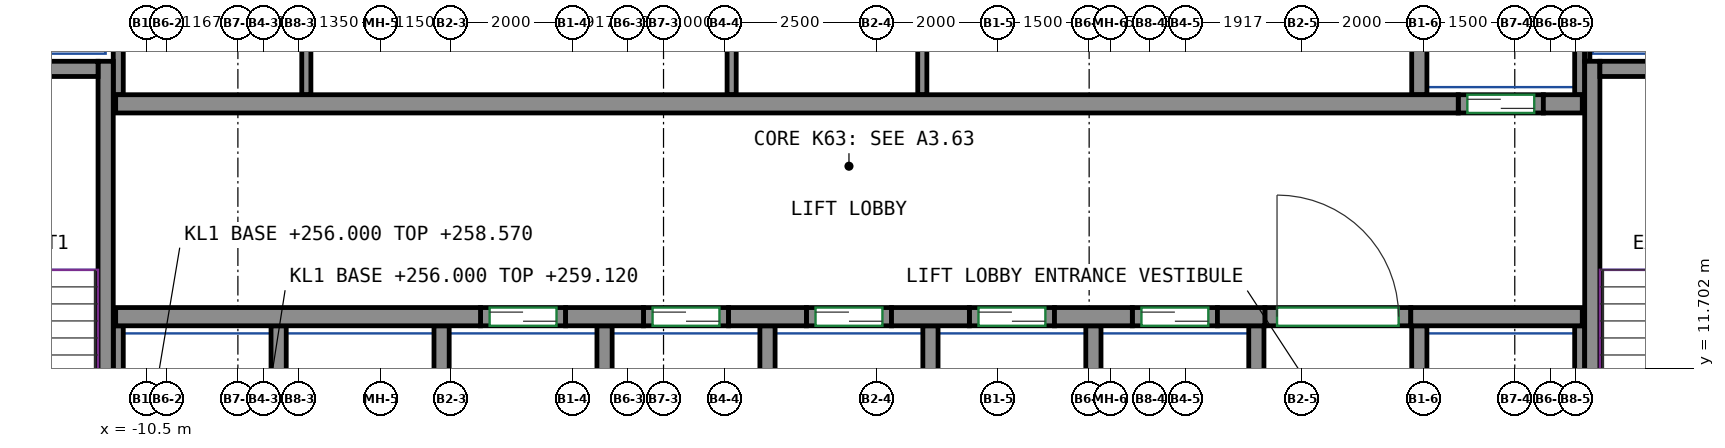
"""IFC4 building model, lengths in metres.
Left out: names, types, materials, properties, quantities, classifications, styles, units other than length and angle.
Written with IfcOpenShell. Run it as: python <this file> out.ifc"""

import sys

from ifc_helpers import new_model, si_unit, direction, frame, frame_2d, origin, place, context, subcontext, project, spatial, rectangle, extrude, source, transform, mapped, element, fill, save


model = new_model("IFC4")
c1 = context("Model", 3, precision=1e-05, world=origin(), true_north=direction((0.0, 1.0)))
c2 = subcontext(c1, "Body", "Model", "MODEL_VIEW")
j1 = project(units=[si_unit("LENGTHUNIT", "METRE"), si_unit("PLANEANGLEUNIT", "RADIAN")], contexts=[c1])
p1 = place(None, origin())
s1 = spatial("IfcSite", under=j1, at=p1, CompositionType="ELEMENT")
p2 = place(p1, origin())
s2 = spatial("IfcBuilding", under=s1, at=p2, CompositionType="ELEMENT")
p3 = place(p2, frame((0.0, 0.0, 256.0)))
s3 = spatial("IfcBuildingStorey", under=s2, at=p3, CompositionType="ELEMENT", Elevation=256.0)
m1 = source(origin(), c2, "Body", "SweptSolid", [
    extrude(rectangle(XDim=7.75, YDim=0.25, at=frame_2d((3.875, 0.0))), origin(), (0.0, 0.0, 1.0), 3.12),
])
p4 = place(p3, frame((-11.175, 9.0, 0.0), z_axis=(0.0, 0.0, 1.0), x_axis=(0.0, 1.0, 0.0)))
e1 = element("IfcWall", 1, at=p4, inside=s3, PredefinedType="SHEAR", context=c2, shape_type="MappedRepresentation", body=[
    mapped(m1, transform((0.0, 0.0, 0.0))),
])
m2 = source(origin(), c2, "Body", "SweptSolid", [
    extrude(rectangle(XDim=3.7, YDim=0.25, at=frame_2d((1.85, 0.0))), origin(), (0.0, 0.0, 1.0), 3.12),
])
p5 = place(p3, frame((-15.0, 16.625, 0.0), z_axis=(0.0, 0.0, 1.0), x_axis=(1.0, 0.0, 0.0)))
e2 = element("IfcWall", 2, at=p5, inside=s3, PredefinedType="SHEAR", context=c2, shape_type="MappedRepresentation", body=[
    mapped(m2, transform((0.0, 0.0, 0.0))),
])
p6 = place(p3, frame((13.275, 9.0, 0.0), z_axis=(0.0, 0.0, 1.0), x_axis=(0.0, 1.0, 0.0)))
e3 = element("IfcWall", 3, at=p6, inside=s3, PredefinedType="SHEAR", context=c2, shape_type="MappedRepresentation", body=[
    mapped(m1, transform((0.0, 0.0, 0.0))),
])
m3 = source(origin(), c2, "Body", "SweptSolid", [
    extrude(rectangle(XDim=3.7, YDim=0.25, at=frame_2d((1.85, 0.0))), origin(), (0.0, 0.0, 1.0), 3.12),
])
p7 = place(p3, frame((13.4, 16.625, 0.0), z_axis=(0.0, 0.0, 1.0), x_axis=(1.0, 0.0, 0.0)))
e4 = element("IfcWall", 4, at=p7, inside=s3, PredefinedType="SHEAR", context=c2, shape_type="MappedRepresentation", body=[
    mapped(m3, transform((0.0, 0.0, 0.0))),
])
m4 = source(origin(), c2, "Body", "SweptSolid", [
    extrude(rectangle(XDim=6.0, YDim=0.3, at=frame_2d((3.0, 0.0))), origin(), (0.0, 0.0, 1.0), 3.12),
])
p8 = place(p3, frame((-11.01, 12.55, 0.0), z_axis=(0.0, 0.0, 1.0), x_axis=(1.0, 0.0, 0.0)))
e5 = element("IfcWall", 5, at=p8, inside=s3, PredefinedType="SHEAR", context=c2, shape_type="MappedRepresentation", body=[
    mapped(m4, transform((0.0, 0.0, 0.0))),
])
m5 = source(origin(), c2, "Body", "SweptSolid", [
    extrude(rectangle(XDim=1.28, YDim=0.3, at=frame_2d((0.64, 0.0))), origin(), (0.0, 0.0, 1.0), 3.12),
])
for number, where, z_axis, x_axis in (
    (6, (-3.61, 12.55, 0.0), (0.0, 0.0, 1.0), (1.0, 0.0, 0.0)),
    (7, (-0.93, 12.55, 0.0), (0.0, 0.0, 1.0), (1.0, 0.0, 0.0)),
    (8, (1.75, 12.55, 0.0), (0.0, 0.0, 1.0), (1.0, 0.0, 0.0)),
    (9, (4.43, 12.55, 0.0), (0.0, 0.0, 1.0), (1.0, 0.0, 0.0)),
):
    element("IfcWall", number, at=place(p3, frame(where, z_axis=z_axis, x_axis=x_axis)), inside=s3, PredefinedType="SHEAR", context=c2, shape_type="MappedRepresentation", body=[
        mapped(m5, transform((0.0, 0.0, 0.0))),
    ])
m6 = source(origin(), c2, "Body", "SweptSolid", [
    extrude(rectangle(XDim=0.78, YDim=0.3, at=frame_2d((0.39, 0.0))), origin(), (0.0, 0.0, 1.0), 3.12),
])
p9 = place(p3, frame((7.11, 12.55, 0.0), z_axis=(0.0, 0.0, 1.0), x_axis=(1.0, 0.0, 0.0)))
e10 = element("IfcWall", 10, at=p9, inside=s3, PredefinedType="SHEAR", context=c2, shape_type="MappedRepresentation", body=[
    mapped(m6, transform((0.0, 0.0, 0.0))),
])
m7 = source(origin(), c2, "Body", "SweptSolid", [
    extrude(rectangle(XDim=2.82, YDim=0.3, at=frame_2d((1.41, 0.0))), origin(), (0.0, 0.0, 1.0), 3.12),
])
p10 = place(p3, frame((10.29, 12.55, 0.0), z_axis=(0.0, 0.0, 1.0), x_axis=(1.0, 0.0, 0.0)))
e11 = element("IfcWall", 11, at=p10, inside=s3, PredefinedType="SHEAR", context=c2, shape_type="MappedRepresentation", body=[
    mapped(m7, transform((0.0, 0.0, 0.0))),
])
m8 = source(origin(), c2, "Body", "SweptSolid", [
    extrude(rectangle(XDim=22.08, YDim=0.3, at=frame_2d((11.04, 0.0))), origin(), (0.0, 0.0, 1.0), 3.12),
])
p11 = place(p3, frame((-11.01, 16.05, 0.0), z_axis=(0.0, 0.0, 1.0), x_axis=(1.0, 0.0, 0.0)))
e12 = element("IfcWall", 12, at=p11, inside=s3, PredefinedType="SHEAR", context=c2, shape_type="MappedRepresentation", body=[
    mapped(m8, transform((0.0, 0.0, 0.0))),
])
m9 = source(origin(), c2, "Body", "SweptSolid", [
    extrude(rectangle(XDim=0.64, YDim=0.3, at=frame_2d((0.32, 0.0))), origin(), (0.0, 0.0, 1.0), 3.12),
])
p12 = place(p3, frame((12.47, 16.05, 0.0), z_axis=(0.0, 0.0, 1.0), x_axis=(1.0, 0.0, 0.0)))
e13 = element("IfcWall", 13, at=p12, inside=s3, PredefinedType="SHEAR", context=c2, shape_type="MappedRepresentation", body=[
    mapped(m9, transform((0.0, 0.0, 0.0))),
])
m10 = source(origin(), c2, "Body", "SweptSolid", [
    extrude(rectangle(XDim=1.4, YDim=0.3, at=frame_2d((0.7, 0.0))), origin(), (0.0, 0.0, 1.0), 3.12),
])
p13 = place(p3, frame((-5.01, 12.55, 0.0), z_axis=(0.0, 0.0, 1.0), x_axis=(1.0, 0.0, 0.0)))
e14 = element("IfcWall", 14, at=p13, inside=s3, PredefinedType="PARTITIONING", context=c2, shape_type="MappedRepresentation", body=[
    mapped(m10, transform((0.0, 0.0, 0.0))),
])
p14 = place(p13, frame((0.15, 0.0, 0.0)))
e15 = element("IfcOpeningElement", 15, at=p14, cuts=e14, PredefinedType="OPENING", context=c2, shape_type="SweptSolid", body=[
    extrude(rectangle(XDim=1.1, YDim=2.1, at=frame_2d((0.55, 1.05))), frame((0.0, 0.16, 0.0), z_axis=(0.0, -1.0, 0.0), x_axis=(1.0, 0.0, 0.0)), (0.0, 0.0, 1.0), 0.32),
])
m11 = source(origin(), c2, "Body", "SweptSolid", [
    extrude(rectangle(XDim=1.4, YDim=0.3, at=frame_2d((0.7, 0.0))), origin(), (0.0, 0.0, 1.0), 3.12),
])
p15 = place(p3, frame((-2.33, 12.55, 0.0), z_axis=(0.0, 0.0, 1.0), x_axis=(1.0, 0.0, 0.0)))
e16 = element("IfcWall", 16, at=p15, inside=s3, PredefinedType="PARTITIONING", context=c2, shape_type="MappedRepresentation", body=[
    mapped(m11, transform((0.0, 0.0, 0.0))),
])
p16 = place(p15, frame((0.15, 0.0, 0.0)))
e17 = element("IfcOpeningElement", 17, at=p16, cuts=e16, PredefinedType="OPENING", context=c2, shape_type="SweptSolid", body=[
    extrude(rectangle(XDim=1.1, YDim=2.1, at=frame_2d((0.55, 1.05))), frame((0.0, 0.16, 0.0), z_axis=(0.0, -1.0, 0.0), x_axis=(1.0, 0.0, 0.0)), (0.0, 0.0, 1.0), 0.32),
])
p17 = place(p3, frame((0.35, 12.55, 0.0), z_axis=(0.0, 0.0, 1.0), x_axis=(1.0, 0.0, 0.0)))
e18 = element("IfcWall", 18, at=p17, inside=s3, PredefinedType="PARTITIONING", context=c2, shape_type="MappedRepresentation", body=[
    mapped(m10, transform((0.0, 0.0, 0.0))),
])
p18 = place(p17, frame((0.15, 0.0, 0.0)))
e19 = element("IfcOpeningElement", 19, at=p18, cuts=e18, PredefinedType="OPENING", context=c2, shape_type="SweptSolid", body=[
    extrude(rectangle(XDim=1.1, YDim=2.1, at=frame_2d((0.55, 1.05))), frame((0.0, 0.16, 0.0), z_axis=(0.0, -1.0, 0.0), x_axis=(1.0, 0.0, 0.0)), (0.0, 0.0, 1.0), 0.32),
])
p19 = place(p3, frame((3.03, 12.55, 0.0), z_axis=(0.0, 0.0, 1.0), x_axis=(1.0, 0.0, 0.0)))
e20 = element("IfcWall", 20, at=p19, inside=s3, PredefinedType="PARTITIONING", context=c2, shape_type="MappedRepresentation", body=[
    mapped(m10, transform((0.0, 0.0, 0.0))),
])
p20 = place(p19, frame((0.15, 0.0, 0.0)))
e21 = element("IfcOpeningElement", 21, at=p20, cuts=e20, PredefinedType="OPENING", context=c2, shape_type="SweptSolid", body=[
    extrude(rectangle(XDim=1.1, YDim=2.1, at=frame_2d((0.55, 1.05))), frame((0.0, 0.16, 0.0), z_axis=(0.0, -1.0, 0.0), x_axis=(1.0, 0.0, 0.0)), (0.0, 0.0, 1.0), 0.32),
])
p21 = place(p3, frame((5.71, 12.55, 0.0), z_axis=(0.0, 0.0, 1.0), x_axis=(1.0, 0.0, 0.0)))
e22 = element("IfcWall", 22, at=p21, inside=s3, PredefinedType="PARTITIONING", context=c2, shape_type="MappedRepresentation", body=[
    mapped(m11, transform((0.0, 0.0, 0.0))),
])
p22 = place(p21, frame((0.15, 0.0, 0.0)))
e23 = element("IfcOpeningElement", 23, at=p22, cuts=e22, PredefinedType="OPENING", context=c2, shape_type="SweptSolid", body=[
    extrude(rectangle(XDim=1.1, YDim=2.1, at=frame_2d((0.55, 1.05))), frame((0.0, 0.16, 0.0), z_axis=(0.0, -1.0, 0.0), x_axis=(1.0, 0.0, 0.0)), (0.0, 0.0, 1.0), 0.32),
])
p23 = place(p3, frame((11.07, 16.05, 0.0), z_axis=(0.0, 0.0, 1.0), x_axis=(1.0, 0.0, 0.0)))
e24 = element("IfcWall", 24, at=p23, inside=s3, PredefinedType="PARTITIONING", context=c2, shape_type="MappedRepresentation", body=[
    mapped(m10, transform((0.0, 0.0, 0.0))),
])
p24 = place(p23, frame((0.15, 0.0, 0.0)))
e25 = element("IfcOpeningElement", 25, at=p24, cuts=e24, PredefinedType="OPENING", context=c2, shape_type="SweptSolid", body=[
    extrude(rectangle(XDim=1.1, YDim=2.1, at=frame_2d((0.55, 1.05))), frame((0.0, 0.16, 0.0), z_axis=(0.0, -1.0, 0.0), x_axis=(1.0, 0.0, 0.0)), (0.0, 0.0, 1.0), 0.32),
])
m12 = source(origin(), c2, "Body", "SweptSolid", [
    extrude(rectangle(XDim=2.4, YDim=0.3, at=frame_2d((1.2, 0.0))), origin(), (0.0, 0.0, 1.0), 3.12),
])
p25 = place(p3, frame((7.89, 12.55, 0.0), z_axis=(0.0, 0.0, 1.0), x_axis=(1.0, 0.0, 0.0)))
e26 = element("IfcWall", 26, at=p25, inside=s3, PredefinedType="PARTITIONING", context=c2, shape_type="MappedRepresentation", body=[
    mapped(m12, transform((0.0, 0.0, 0.0))),
])
p26 = place(p25, frame((0.2, 0.0, 0.0)))
e27 = element("IfcOpeningElement", 27, at=p26, cuts=e26, PredefinedType="OPENING", context=c2, shape_type="SweptSolid", body=[
    extrude(rectangle(XDim=2.0, YDim=2.1, at=frame_2d((1.0, 1.05))), frame((0.0, 0.16, 0.0), z_axis=(0.0, -1.0, 0.0), x_axis=(1.0, 0.0, 0.0)), (0.0, 0.0, 1.0), 0.32),
])
m13 = source(origin(), c2, "Body", "SweptSolid", [
    extrude(rectangle(XDim=3.275, YDim=0.165, at=frame_2d((1.638, 0.0))), origin(), (0.0, 0.0, 1.0), 3.12),
])
p27 = place(p3, frame((13.067, 16.2, 0.0), z_axis=(0.0, 0.0, 1.0), x_axis=(0.0, 1.0, 0.0)))
e28 = element("IfcWall", 28, at=p27, inside=s3, PredefinedType="PARTITIONING", context=c2, shape_type="MappedRepresentation", body=[
    mapped(m13, transform((0.0, 0.0, 0.0))),
])
m14 = source(origin(), c2, "Body", "SweptSolid", [
    extrude(rectangle(XDim=4.8, YDim=0.165, at=frame_2d((2.4, 0.0))), origin(), (0.0, 0.0, 1.0), 3.12),
])
p28 = place(p3, frame((-10.968, 16.2, 0.0), z_axis=(0.0, 0.0, 1.0), x_axis=(0.0, 1.0, 0.0)))
e29 = element("IfcWall", 29, at=p28, inside=s3, PredefinedType="PARTITIONING", context=c2, shape_type="MappedRepresentation", body=[
    mapped(m14, transform((0.0, 0.0, 0.0))),
])
m15 = source(origin(), c2, "Body", "SweptSolid", [
    extrude(rectangle(XDim=3.275, YDim=0.25, at=frame_2d((1.638, 0.0))), origin(), (0.0, 0.0, 1.0), 3.12),
])
p29 = place(p3, frame((10.43, 16.2, 0.0), z_axis=(0.0, 0.0, 1.0), x_axis=(0.0, 1.0, 0.0)))
e30 = element("IfcWall", 30, at=p29, inside=s3, PredefinedType="PARTITIONING", context=c2, shape_type="MappedRepresentation", body=[
    mapped(m15, transform((0.0, 0.0, 0.0))),
])
m16 = source(origin(), c2, "Body", "SweptSolid", [
    extrude(rectangle(XDim=2.725, YDim=0.085, at=frame_2d((1.363, 0.0))), origin(), (0.0, 0.0, 1.0), 3.12),
])
p30 = place(p3, frame((13.192, 16.75, 0.0), z_axis=(0.0, 0.0, 1.0), x_axis=(0.0, 1.0, 0.0)))
e31 = element("IfcWall", 31, at=p30, inside=s3, PredefinedType="PARTITIONING", context=c2, shape_type="MappedRepresentation", body=[
    mapped(m16, transform((0.0, 0.0, 0.0))),
])
m17 = source(origin(), c2, "Body", "SweptSolid", [
    extrude(rectangle(XDim=3.4, YDim=0.25, at=frame_2d((1.7, 0.0))), origin(), (0.0, 0.0, 1.0), 3.12),
])
p31 = place(p3, frame((10.43, 9.0, 0.0), z_axis=(0.0, 0.0, 1.0), x_axis=(0.0, 1.0, 0.0)))
e32 = element("IfcWall", 32, at=p31, inside=s3, PredefinedType="PARTITIONING", context=c2, shape_type="MappedRepresentation", body=[
    mapped(m17, transform((0.0, 0.0, 0.0))),
])
m18 = source(origin(), c2, "Body", "SweptSolid", [
    extrude(rectangle(XDim=3.4, YDim=0.165, at=frame_2d((1.7, 0.0))), origin(), (0.0, 0.0, 1.0), 3.12),
])
p32 = place(p3, frame((13.067, 9.0, 0.0), z_axis=(0.0, 0.0, 1.0), x_axis=(0.0, 1.0, 0.0)))
e33 = element("IfcWall", 33, at=p32, inside=s3, PredefinedType="PARTITIONING", context=c2, shape_type="MappedRepresentation", body=[
    mapped(m18, transform((0.0, 0.0, 0.0))),
])
for number, where, z_axis, x_axis in (
    (34, (2.39, 9.0, 0.0), (0.0, 0.0, 1.0), (0.0, 1.0, 0.0)),
    (35, (5.07, 9.0, 0.0), (0.0, 0.0, 1.0), (0.0, 1.0, 0.0)),
    (36, (7.75, 9.0, 0.0), (0.0, 0.0, 1.0), (0.0, 1.0, 0.0)),
    (37, (-0.29, 9.0, 0.0), (0.0, 0.0, 1.0), (0.0, 1.0, 0.0)),
):
    element("IfcWall", number, at=place(p3, frame(where, z_axis=z_axis, x_axis=x_axis)), inside=s3, PredefinedType="PARTITIONING", context=c2, shape_type="MappedRepresentation", body=[
        mapped(m17, transform((0.0, 0.0, 0.0))),
    ])
p33 = place(p3, frame((-10.968, 9.0, 0.0), z_axis=(0.0, 0.0, 1.0), x_axis=(0.0, 1.0, 0.0)))
e38 = element("IfcWall", 38, at=p33, inside=s3, PredefinedType="PARTITIONING", context=c2, shape_type="MappedRepresentation", body=[
    mapped(m18, transform((0.0, 0.0, 0.0))),
])
for number, where, z_axis, x_axis in (
    (39, (-2.97, 9.0, 0.0), (0.0, 0.0, 1.0), (0.0, 1.0, 0.0)),
    (40, (-5.65, 9.0, 0.0), (0.0, 0.0, 1.0), (0.0, 1.0, 0.0)),
    (41, (-8.33, 9.0, 0.0), (0.0, 0.0, 1.0), (0.0, 1.0, 0.0)),
):
    element("IfcWall", number, at=place(p3, frame(where, z_axis=z_axis, x_axis=x_axis)), inside=s3, PredefinedType="PARTITIONING", context=c2, shape_type="MappedRepresentation", body=[
        mapped(m17, transform((0.0, 0.0, 0.0))),
    ])
m19 = source(origin(), c2, "Body", "SweptSolid", [
    extrude(rectangle(XDim=4.8, YDim=0.15, at=frame_2d((2.4, 0.0))), origin(), (0.0, 0.0, 1.0), 3.12),
])
for number, where, z_axis, x_axis in (
    (42, (-7.875, 16.2, 0.0), (0.0, 0.0, 1.0), (0.0, 1.0, 0.0)),
    (43, (-0.88, 16.2, 0.0), (0.0, 0.0, 1.0), (0.0, 1.0, 0.0)),
    (44, (2.256, 16.2, 0.0), (0.0, 0.0, 1.0), (0.0, 1.0, 0.0)),
):
    element("IfcWall", number, at=place(p3, frame(where, z_axis=z_axis, x_axis=x_axis)), inside=s3, PredefinedType="PARTITIONING", context=c2, shape_type="MappedRepresentation", body=[
        mapped(m19, transform((0.0, 0.0, 0.0))),
    ])
p34 = place(p26, origin())
e45 = element("IfcDoor", 45, at=p34, inside=s3, OperationType="DOUBLE_DOOR_SINGLE_SWING", PredefinedType="DOOR", context=c2, shape_type="SweptSolid", body=[
    extrude(rectangle(XDim=2.0, YDim=2.1, at=frame_2d((1.0, 1.05))), frame((0.0, 0.025, 0.0), z_axis=(0.0, -1.0, 0.0), x_axis=(1.0, 0.0, 0.0)), (0.0, 0.0, 1.0), 0.05),
])
fill(e27, e45)
p35 = place(p14, origin())
e46 = element("IfcDoor", 46, at=p35, inside=s3, OperationType="DOUBLE_DOOR_SLIDING", PredefinedType="DOOR", context=c2, shape_type="SweptSolid", body=[
    extrude(rectangle(XDim=1.1, YDim=2.1, at=frame_2d((0.55, 1.05))), frame((0.0, 0.025, 0.0), z_axis=(0.0, -1.0, 0.0), x_axis=(1.0, 0.0, 0.0)), (0.0, 0.0, 1.0), 0.05),
])
fill(e15, e46)
p36 = place(p16, origin())
e47 = element("IfcDoor", 47, at=p36, inside=s3, OperationType="DOUBLE_DOOR_SLIDING", PredefinedType="DOOR", context=c2, shape_type="SweptSolid", body=[
    extrude(rectangle(XDim=1.1, YDim=2.1, at=frame_2d((0.55, 1.05))), frame((0.0, 0.025, 0.0), z_axis=(0.0, -1.0, 0.0), x_axis=(1.0, 0.0, 0.0)), (0.0, 0.0, 1.0), 0.05),
])
fill(e17, e47)
p37 = place(p18, origin())
e48 = element("IfcDoor", 48, at=p37, inside=s3, OperationType="DOUBLE_DOOR_SLIDING", PredefinedType="DOOR", context=c2, shape_type="SweptSolid", body=[
    extrude(rectangle(XDim=1.1, YDim=2.1, at=frame_2d((0.55, 1.05))), frame((0.0, 0.025, 0.0), z_axis=(0.0, -1.0, 0.0), x_axis=(1.0, 0.0, 0.0)), (0.0, 0.0, 1.0), 0.05),
])
fill(e19, e48)
p38 = place(p20, origin())
e49 = element("IfcDoor", 49, at=p38, inside=s3, OperationType="DOUBLE_DOOR_SLIDING", PredefinedType="DOOR", context=c2, shape_type="SweptSolid", body=[
    extrude(rectangle(XDim=1.1, YDim=2.1, at=frame_2d((0.55, 1.05))), frame((0.0, 0.025, 0.0), z_axis=(0.0, -1.0, 0.0), x_axis=(1.0, 0.0, 0.0)), (0.0, 0.0, 1.0), 0.05),
])
fill(e21, e49)
p39 = place(p22, origin())
e50 = element("IfcDoor", 50, at=p39, inside=s3, OperationType="DOUBLE_DOOR_SLIDING", PredefinedType="DOOR", context=c2, shape_type="SweptSolid", body=[
    extrude(rectangle(XDim=1.1, YDim=2.1, at=frame_2d((0.55, 1.05))), frame((0.0, 0.025, 0.0), z_axis=(0.0, -1.0, 0.0), x_axis=(1.0, 0.0, 0.0)), (0.0, 0.0, 1.0), 0.05),
])
fill(e23, e50)
p40 = place(p24, origin())
e51 = element("IfcDoor", 51, at=p40, inside=s3, OperationType="DOUBLE_DOOR_SLIDING", PredefinedType="DOOR", context=c2, shape_type="SweptSolid", body=[
    extrude(rectangle(XDim=1.1, YDim=2.1, at=frame_2d((0.55, 1.05))), frame((0.0, 0.025, 0.0), z_axis=(0.0, -1.0, 0.0), x_axis=(1.0, 0.0, 0.0)), (0.0, 0.0, 1.0), 0.05),
])
fill(e25, e51)
save(model, sys.argv[1])
